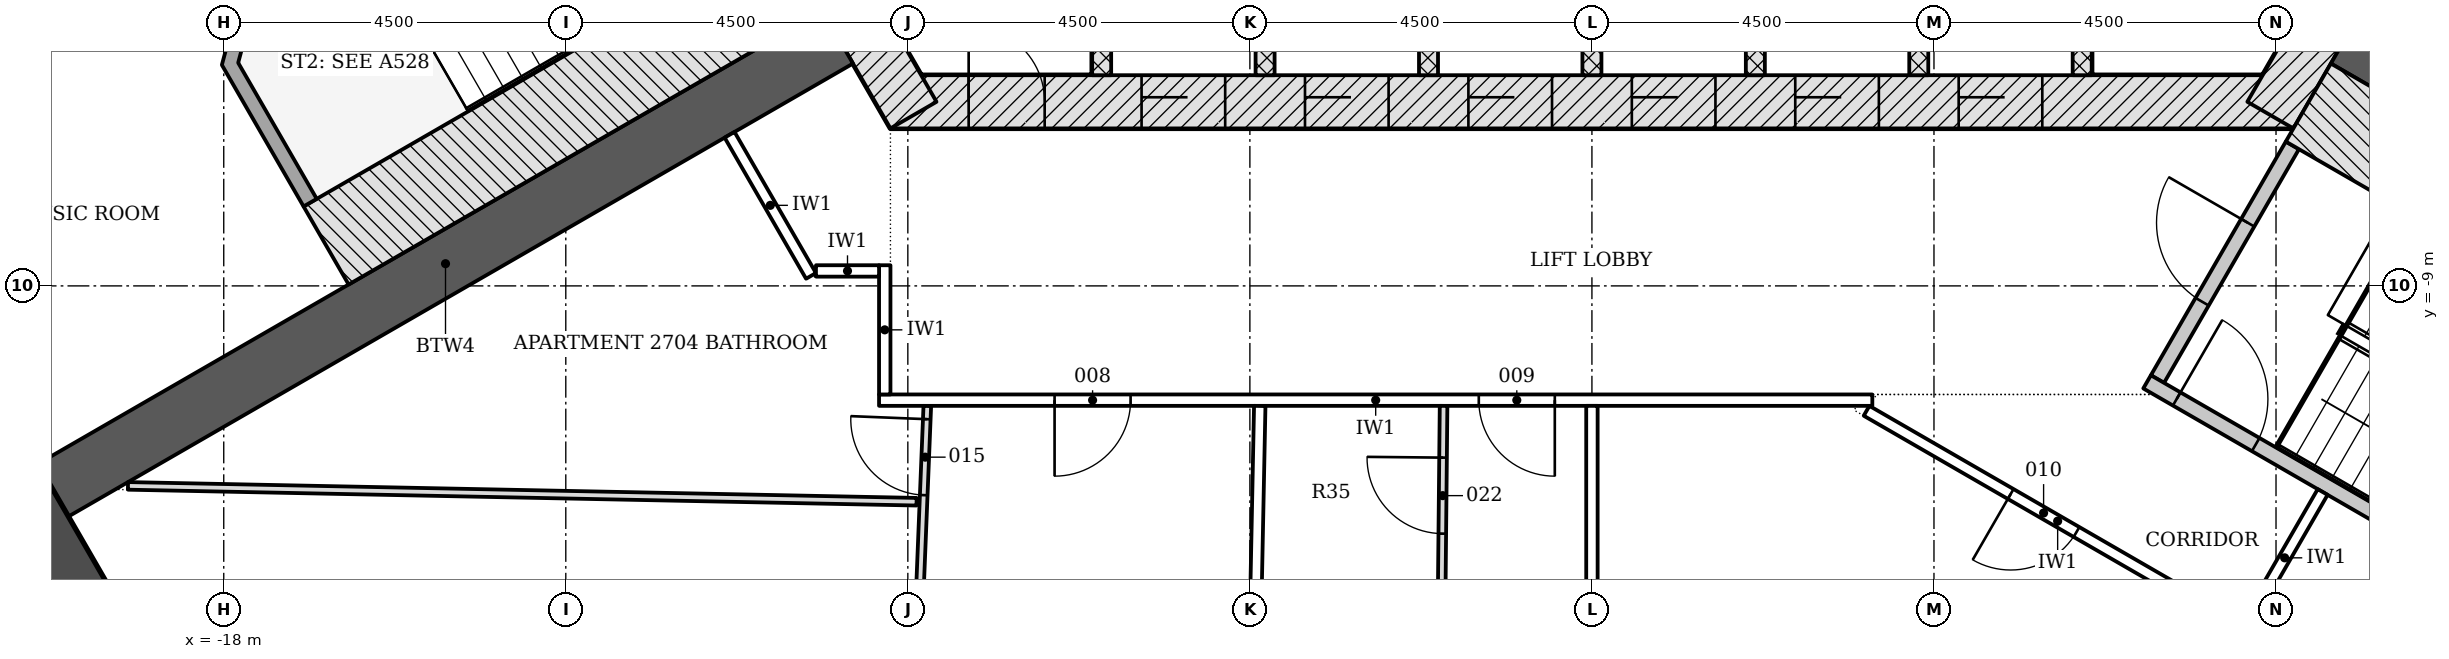
"""IFC4 building model, lengths in metres.
Left out: names, types, materials, properties, quantities, classifications, styles, units other than length and angle.
Written with IfcOpenShell. Run it as: python <this file> out.ifc"""

import sys

from ifc_helpers import new_model, si_unit, direction, frame, frame_2d, origin, origin_2d, place, context, subcontext, project, spatial, polyline, rectangle, outline, extrude, element, fill, save


model = new_model("IFC4")
c1 = context("Model", 3, precision=1e-05, world=origin(), true_north=direction((0.0, 1.0)))
c2 = subcontext(c1, "Body", "Model", "MODEL_VIEW")
j1 = project(units=[si_unit("LENGTHUNIT", "METRE"), si_unit("PLANEANGLEUNIT", "RADIAN")], contexts=[c1])
p1 = place(None, origin())
s1 = spatial("IfcSite", under=j1, at=p1, CompositionType="ELEMENT")
p2 = place(p1, origin())
s2 = spatial("IfcBuilding", under=s1, at=p2, CompositionType="ELEMENT")
p3 = place(p2, frame((0.0, 0.0, 105.9)))
s3 = spatial("IfcBuildingStorey", under=s2, at=p3, CompositionType="ELEMENT", Elevation=105.9)
p4 = place(p3, frame((-9.229, -6.578, -0.2), z_axis=(0.0, 0.0, 1.0), x_axis=(1.0, 0.0, 0.0)))
e1 = element("IfcWall", 1, at=p4, inside=s3, PredefinedType="SHEAR", context=c2, shape_type="SweptSolid", body=[
    extrude(rectangle(XDim=18.458, YDim=0.7, at=frame_2d((9.229, 0.0))), origin(), (0.0, 0.0, 1.0), 3.6),
])
p5 = place(p4, frame((3.304, 0.0, 0.2)))
e2 = element("IfcOpeningElement", 2, at=p5, cuts=e1, PredefinedType="OPENING", context=c2, shape_type="SweptSolid", body=[
    extrude(rectangle(XDim=1.1, YDim=2.1, at=frame_2d((0.55, 1.05))), frame((0.0, 0.36, 0.0), z_axis=(0.0, -1.0, 0.0), x_axis=(1.0, 0.0, 0.0)), (0.0, 0.0, 1.0), 0.72),
])
p6 = place(p4, frame((5.454, 0.0, 0.2)))
e3 = element("IfcOpeningElement", 3, at=p6, cuts=e1, PredefinedType="OPENING", context=c2, shape_type="SweptSolid", body=[
    extrude(rectangle(XDim=1.1, YDim=2.1, at=frame_2d((0.55, 1.05))), frame((0.0, 0.36, 0.0), z_axis=(0.0, -1.0, 0.0), x_axis=(1.0, 0.0, 0.0)), (0.0, 0.0, 1.0), 0.72),
])
p7 = place(p4, frame((7.604, 0.0, 0.2)))
e4 = element("IfcOpeningElement", 4, at=p7, cuts=e1, PredefinedType="OPENING", context=c2, shape_type="SweptSolid", body=[
    extrude(rectangle(XDim=1.1, YDim=2.1, at=frame_2d((0.55, 1.05))), frame((0.0, 0.36, 0.0), z_axis=(0.0, -1.0, 0.0), x_axis=(1.0, 0.0, 0.0)), (0.0, 0.0, 1.0), 0.72),
])
p8 = place(p4, frame((9.754, 0.0, 0.2)))
e5 = element("IfcOpeningElement", 5, at=p8, cuts=e1, PredefinedType="OPENING", context=c2, shape_type="SweptSolid", body=[
    extrude(rectangle(XDim=1.1, YDim=2.1, at=frame_2d((0.55, 1.05))), frame((0.0, 0.36, 0.0), z_axis=(0.0, -1.0, 0.0), x_axis=(1.0, 0.0, 0.0)), (0.0, 0.0, 1.0), 0.72),
])
p9 = place(p4, frame((11.904, 0.0, 0.2)))
e6 = element("IfcOpeningElement", 6, at=p9, cuts=e1, PredefinedType="OPENING", context=c2, shape_type="SweptSolid", body=[
    extrude(rectangle(XDim=1.1, YDim=2.1, at=frame_2d((0.55, 1.05))), frame((0.0, 0.36, 0.0), z_axis=(0.0, -1.0, 0.0), x_axis=(1.0, 0.0, 0.0)), (0.0, 0.0, 1.0), 0.72),
])
p10 = place(p4, frame((14.054, 0.0, 0.2)))
e7 = element("IfcOpeningElement", 7, at=p10, cuts=e1, PredefinedType="OPENING", context=c2, shape_type="SweptSolid", body=[
    extrude(rectangle(XDim=1.1, YDim=2.1, at=frame_2d((0.55, 1.05))), frame((0.0, 0.36, 0.0), z_axis=(0.0, -1.0, 0.0), x_axis=(1.0, 0.0, 0.0)), (0.0, 0.0, 1.0), 0.72),
])
p11 = place(p4, frame((1.029, 0.0, 0.2)))
e8 = element("IfcOpeningElement", 8, at=p11, cuts=e1, PredefinedType="OPENING", context=c2, shape_type="SweptSolid", body=[
    extrude(rectangle(XDim=1.0, YDim=2.1, at=frame_2d((0.5, 1.05))), frame((0.0, 0.36, 0.0), z_axis=(0.0, -1.0, 0.0), x_axis=(1.0, 0.0, 0.0)), (0.0, 0.0, 1.0), 0.72),
])
for number, where, z_axis, x_axis in (
    (9, (8.926, -6.753, -0.2), (0.0, 0.0, 1.0), (0.5, 0.866, 0.0)),
    (10, (-10.311, -4.353, -0.2), (0.0, 0.0, 1.0), (0.5, -0.866, 0.0)),
):
    element("IfcWall", number, at=place(p3, frame(where, z_axis=z_axis, x_axis=x_axis)), inside=s3, PredefinedType="SHEAR", context=c2, shape_type="SweptSolid", body=[
        extrude(rectangle(XDim=2.771, YDim=0.7, at=frame_2d((1.386, 0.0))), origin(), (0.0, 0.0, 1.0), 3.6),
    ])
for number, where, z_axis, x_axis in (
    (11, (-9.922, -5.728, -0.2), (0.0, 0.0, 1.0), (-0.866, -0.5, 0.0)),
    (12, (9.922, -5.728, -0.2), (0.0, 0.0, 1.0), (0.866, -0.5, 0.0)),
):
    element("IfcWall", number, at=place(p3, frame(where, z_axis=z_axis, x_axis=x_axis)), inside=s3, PredefinedType="SHEAR", context=c2, shape_type="SweptSolid", body=[
        extrude(rectangle(XDim=11.918, YDim=0.8, at=frame_2d((5.959, 0.0))), origin(), (0.0, 0.0, 1.0), 3.6),
    ])
p12 = place(p3, frame((-21.542, -12.438, -0.2), z_axis=(0.0, 0.0, 1.0), x_axis=(-0.866025403784, -0.5, 0.0)))
e13 = element("IfcColumn", 13, at=p12, inside=s3, PredefinedType="COLUMN", context=c2, shape_type="SweptSolid", body=[
    extrude(rectangle(XDim=3.0, YDim=3.0, at=origin_2d()), origin(), (0.0, 0.0, 1.0), 3.6),
])
p13 = place(p3, origin())
e14 = element("IfcWall", 14, at=p13, inside=s3, PredefinedType="NOTDEFINED", context=c2, shape_type="SweptSolid", body=[
    extrude(outline(polyline([(-23.152, -7.396), (-24.245, -9.732), (-24.631, -11.114), (-24.565, -12.547), (-24.054, -13.887), (-23.148, -15.0), (-21.94, -15.774), (-20.551, -16.13), (-17.981, -16.352), (-17.955, -16.053), (-20.5, -15.833), (-21.819, -15.495), (-22.946, -14.774), (-23.791, -13.735), (-24.267, -12.485), (-24.329, -11.148), (-23.962, -9.837), (-22.88, -7.523), (-23.152, -7.396)])), origin(), (0.0, 0.0, 1.0), 3.3),
])
for number, where, z_axis, x_axis in (
    (15, (-6.45, -6.228, -0.2), (0.0, 0.0, 1.0), (0.0, 1.0, 0.0)),
    (16, (-4.3, -6.228, -0.2), (0.0, 0.0, 1.0), (0.0, 1.0, 0.0)),
    (17, (-2.15, -6.228, -0.2), (0.0, 0.0, 1.0), (0.0, 1.0, 0.0)),
    (18, (0.0, -6.228, -0.2), (0.0, 0.0, 1.0), (0.0, 1.0, 0.0)),
    (19, (2.15, -6.228, -0.2), (0.0, 0.0, 1.0), (0.0, 1.0, 0.0)),
    (20, (4.3, -6.228, -0.2), (0.0, 0.0, 1.0), (0.0, 1.0, 0.0)),
    (21, (6.45, -6.228, -0.2), (0.0, 0.0, 1.0), (0.0, 1.0, 0.0)),
):
    element("IfcWall", number, at=place(p3, frame(where, z_axis=z_axis, x_axis=x_axis)), inside=s3, PredefinedType="PARTITIONING", context=c2, shape_type="SweptSolid", body=[
        extrude(rectangle(XDim=2.5, YDim=0.25, at=frame_2d((1.25, 0.0))), origin(), (0.0, 0.0, 1.0), 3.6),
    ])
p14 = place(p3, frame((-10.418, -4.868, -0.2), z_axis=(0.0, 0.0, 1.0), x_axis=(-0.866018442252, -0.500012057535, 0.0)))
e22 = element("IfcWall", 22, at=p14, inside=s3, PredefinedType="SHEAR", context=c2, shape_type="SweptSolid", body=[
    extrude(rectangle(XDim=7.2, YDim=1.186, at=frame_2d((3.6, 0.0))), origin(), (0.0, 0.0, 1.0), 3.6),
])
p15 = place(p3, frame((0.0, 0.0, -0.2)))
e23 = element("IfcWall", 23, at=p15, inside=s3, PredefinedType="SHEAR", context=c2, shape_type="SweptSolid", body=[
    extrude(outline(polyline([(-17.439, -3.907), (-18.025, -6.093), (-16.95, -7.955), (-16.777, -7.855), (-17.81, -6.065), (-17.267, -4.039), (-17.339, -4.081), (-17.339, -4.081), (-17.339, -4.081), (-17.339, -4.081), (-17.339, -4.081), (-17.339, -4.081), (-17.339, -4.081), (-17.339, -4.081), (-17.339, -4.081), (-17.339, -4.081), (-17.339, -4.081), (-17.339, -4.081), (-17.339, -4.081), (-17.339, -4.081), (-17.339, -4.081), (-17.339, -4.081), (-17.339, -4.081), (-17.439, -3.907)])), origin(), (0.0, 0.0, 1.0), 3.6),
])
p16 = place(p3, frame((7.44, -10.226, -0.2), z_axis=(0.0, 0.0, 1.0), x_axis=(0.500022077904, 0.866012656725, 0.0)))
e24 = element("IfcWall", 24, at=p16, inside=s3, PredefinedType="SHEAR", context=c2, shape_type="SweptSolid", body=[
    extrude(rectangle(XDim=3.55, YDim=0.2, at=frame_2d((1.775, 0.0))), origin(), (0.0, 0.0, 1.0), 3.6),
])
p17 = place(p16, frame((1.175, 0.0, 0.2)))
e25 = element("IfcOpeningElement", 25, at=p17, cuts=e24, PredefinedType="OPENING", context=c2, shape_type="SweptSolid", body=[
    extrude(rectangle(XDim=1.2, YDim=2.1, at=frame_2d((0.6, 1.05))), frame((0.0, 0.11, 0.0), z_axis=(0.0, -1.0, 0.0), x_axis=(1.0, 0.0, 0.0)), (0.0, 0.0, 1.0), 0.22),
])
p18 = place(p3, frame((7.304, -10.262, -0.2), z_axis=(0.0, 0.0, 1.0), x_axis=(0.866026594901, -0.49999793692, 0.0)))
e26 = element("IfcWall", 26, at=p18, inside=s3, PredefinedType="SHEAR", context=c2, shape_type="SweptSolid", body=[
    extrude(rectangle(XDim=5.6, YDim=0.2, at=frame_2d((2.8, 0.0))), origin(), (0.0, 0.0, 1.0), 3.6),
])
p19 = place(p18, frame((0.45, 0.0, 0.2)))
e27 = element("IfcOpeningElement", 27, at=p19, cuts=e26, PredefinedType="OPENING", context=c2, shape_type="SweptSolid", body=[
    extrude(rectangle(XDim=1.2, YDim=2.1, at=frame_2d((0.6, 1.05))), frame((0.0, 0.11, 0.0), z_axis=(0.0, -1.0, 0.0), x_axis=(1.0, 0.0, 0.0)), (0.0, 0.0, 1.0), 0.22),
])
p20 = place(p3, frame((9.425, -6.588, -0.2), z_axis=(0.0, 0.0, 1.0), x_axis=(0.866018442252, -0.500012057535, 0.0)))
e28 = element("IfcWall", 28, at=p20, inside=s3, PredefinedType="SHEAR", context=c2, shape_type="SweptSolid", body=[
    extrude(rectangle(XDim=7.2, YDim=1.186, at=frame_2d((3.6, 0.0))), origin(), (0.0, 0.0, 1.0), 3.6),
])
p21 = place(p3, frame((3.689, -10.503, 0.0), z_axis=(0.0, 0.0, 1.0), x_axis=(-1.0, 0.0, 0.0)))
e29 = element("IfcWall", 29, at=p21, inside=s3, PredefinedType="PARTITIONING", context=c2, shape_type="SweptSolid", body=[
    extrude(rectangle(XDim=13.068, YDim=0.15, at=frame_2d((6.534, 0.0))), origin(), (0.0, 0.0, 1.0), 2.847),
])
p22 = place(p21, frame((9.758, 0.0, 0.0)))
e30 = element("IfcOpeningElement", 30, at=p22, cuts=e29, PredefinedType="OPENING", context=c2, shape_type="SweptSolid", body=[
    extrude(rectangle(XDim=1.0, YDim=2.1, at=frame_2d((0.5, 1.05))), frame((0.0, 0.085, 0.0), z_axis=(0.0, -1.0, 0.0), x_axis=(1.0, 0.0, 0.0)), (0.0, 0.0, 1.0), 0.17),
])
p23 = place(p21, frame((4.177, 0.0, 0.0)))
e31 = element("IfcOpeningElement", 31, at=p23, cuts=e29, PredefinedType="OPENING", context=c2, shape_type="SweptSolid", body=[
    extrude(rectangle(XDim=1.0, YDim=2.1, at=frame_2d((0.5, 1.05))), frame((0.0, 0.085, 0.0), z_axis=(0.0, -1.0, 0.0), x_axis=(1.0, 0.0, 0.0)), (0.0, 0.0, 1.0), 0.17),
])
p24 = place(p3, frame((8.641, -13.546, 0.0), z_axis=(0.0, 0.0, 1.0), x_axis=(-0.866042728627, 0.499969991291, 0.0)))
e32 = element("IfcWall", 32, at=p24, inside=s3, PredefinedType="PARTITIONING", context=c2, shape_type="SweptSolid", body=[
    extrude(rectangle(XDim=5.805, YDim=0.15, at=frame_2d((2.903, 0.0))), origin(), (0.0, 0.0, 1.0), 2.847),
])
p25 = place(p24, frame((2.616, 0.0, 0.0)))
e33 = element("IfcOpeningElement", 33, at=p25, cuts=e32, PredefinedType="OPENING", context=c2, shape_type="SweptSolid", body=[
    extrude(rectangle(XDim=1.0, YDim=2.1, at=frame_2d((0.5, 1.05))), frame((0.0, 0.085, 0.0), z_axis=(0.0, -1.0, 0.0), x_axis=(1.0, 0.0, 0.0)), (0.0, 0.0, 1.0), 0.17),
])
p26 = place(p3, frame((8.614, -13.444, 0.0), z_axis=(0.0, 0.0, 1.0), x_axis=(0.499972520799, 0.866041268327, 0.0)))
e34 = element("IfcWall", 34, at=p26, inside=s3, PredefinedType="PARTITIONING", context=c2, shape_type="SweptSolid", body=[
    extrude(rectangle(XDim=2.0, YDim=0.15, at=frame_2d((1.0, 0.0))), origin(), (0.0, 0.0, 1.0), 2.923),
])
p27 = place(p3, frame((-11.345, -7.012, 0.0), z_axis=(0.0, 0.0, 1.0), x_axis=(0.499998569178, -0.866026229868, 0.0)))
e35 = element("IfcWall", 35, at=p27, inside=s3, PredefinedType="PARTITIONING", context=c2, shape_type="SweptSolid", body=[
    extrude(rectangle(XDim=2.143, YDim=0.15, at=frame_2d((1.072, 0.0))), origin(), (0.0, 0.0, 1.0), 3.4),
])
p28 = place(p3, frame((-9.304, -10.428, 0.0), z_axis=(0.0, 0.0, 1.0), x_axis=(0.0, 1.0, 0.0)))
e36 = element("IfcWall", 36, at=p28, inside=s3, PredefinedType="PARTITIONING", context=c2, shape_type="SweptSolid", body=[
    extrude(rectangle(XDim=1.7, YDim=0.15, at=frame_2d((0.85, 0.0))), origin(), (0.0, 0.0, 1.0), 3.4),
])
p29 = place(p3, frame((-10.209, -8.803, 0.0), z_axis=(0.0, 0.0, 1.0), x_axis=(1.0, 0.0, 0.0)))
e37 = element("IfcWall", 37, at=p29, inside=s3, PredefinedType="PARTITIONING", context=c2, shape_type="SweptSolid", body=[
    extrude(rectangle(XDim=0.83, YDim=0.15, at=frame_2d((0.415, 0.0))), origin(), (0.0, 0.0, 1.0), 3.4),
])
p30 = place(p3, frame((0.0, -16.274, 0.0), z_axis=(0.0, 0.0, 1.0), x_axis=(0.0, 1.0, 0.0)))
e38 = element("IfcWall", 38, at=p30, inside=s3, PredefinedType="PARTITIONING", context=c2, shape_type="SweptSolid", body=[
    extrude(rectangle(XDim=5.696, YDim=0.15, at=frame_2d((2.848, 0.0))), origin(), (0.0, 0.0, 1.0), 2.847),
])
p31 = place(p3, frame((-4.484, -16.229, 0.0), z_axis=(0.0, 0.0, 1.0), x_axis=(0.020089281754, 0.999798190016, 0.0)))
e39 = element("IfcWall", 39, at=p31, inside=s3, PredefinedType="PARTITIONING", context=c2, shape_type="SweptSolid", body=[
    extrude(rectangle(XDim=5.651, YDim=0.15, at=frame_2d((2.826, 0.0))), origin(), (0.0, 0.0, 1.0), 2.847),
])
p32 = place(p3, frame((-8.885, -11.839, 0.0), z_axis=(0.0, 0.0, 1.0), x_axis=(-0.999798608679, 0.020068434987, 0.0)))
e40 = element("IfcWall", 40, at=p32, inside=s3, PredefinedType="PARTITIONING", context=c2, shape_type="SweptSolid", body=[
    extrude(rectangle(XDim=10.377, YDim=0.1, at=frame_2d((5.188, 0.0))), origin(), (0.0, 0.0, 1.0), 2.847),
])
p33 = place(p3, frame((-8.966, -16.094, 0.0), z_axis=(0.0, 0.0, 1.0), x_axis=(0.040167671745, 0.999192953411, 0.0)))
e41 = element("IfcWall", 41, at=p33, inside=s3, PredefinedType="PARTITIONING", context=c2, shape_type="SweptSolid", body=[
    extrude(rectangle(XDim=5.519, YDim=0.1, at=frame_2d((2.759, 0.0))), origin(), (0.0, 0.0, 1.0), 2.847),
])
p34 = place(p33, frame((4.345, 0.0, 0.0)))
e42 = element("IfcOpeningElement", 42, at=p34, cuts=e41, PredefinedType="OPENING", context=c2, shape_type="SweptSolid", body=[
    extrude(rectangle(XDim=1.0, YDim=2.1, at=frame_2d((0.5, 1.05))), frame((0.0, 0.06, 0.0), z_axis=(0.0, -1.0, 0.0), x_axis=(1.0, 0.0, 0.0)), (0.0, 0.0, 1.0), 0.12),
])
p35 = place(p33, frame((1.634, 0.0, 0.0)))
e43 = element("IfcOpeningElement", 43, at=p35, cuts=e41, PredefinedType="OPENING", context=c2, shape_type="SweptSolid", body=[
    extrude(rectangle(XDim=1.0, YDim=2.1, at=frame_2d((0.5, 1.05))), frame((0.0, 0.06, 0.0), z_axis=(0.0, -1.0, 0.0), x_axis=(1.0, 0.0, 0.0)), (0.0, 0.0, 1.0), 0.12),
])
p36 = place(p3, frame((-1.976, -12.959, 0.0), z_axis=(0.0, 0.0, 1.0), x_axis=(0.009947205513, 0.999950525327, 0.0)))
e44 = element("IfcWall", 44, at=p36, inside=s3, PredefinedType="PARTITIONING", context=c2, shape_type="SweptSolid", body=[
    extrude(rectangle(XDim=2.381, YDim=0.1, at=frame_2d((1.19, 0.0))), origin(), (0.0, 0.0, 1.0), 3.4),
])
p37 = place(p36, frame((0.7, 0.0, 0.0)))
e45 = element("IfcOpeningElement", 45, at=p37, cuts=e44, PredefinedType="OPENING", context=c2, shape_type="SweptSolid", body=[
    extrude(rectangle(XDim=1.0, YDim=2.1, at=frame_2d((0.5, 1.05))), frame((0.0, 0.06, 0.0), z_axis=(0.0, -1.0, 0.0), x_axis=(1.0, 0.0, 0.0)), (0.0, 0.0, 1.0), 0.12),
])
p38 = place(p5, origin())
e46 = element("IfcDoor", 46, at=p38, inside=s3, OperationType="DOUBLE_DOOR_SLIDING", PredefinedType="DOOR", context=c2, shape_type="SweptSolid", body=[
    extrude(rectangle(XDim=1.1, YDim=2.1, at=frame_2d((0.55, 1.05))), frame((0.0, 0.025, 0.0), z_axis=(0.0, -1.0, 0.0), x_axis=(1.0, 0.0, 0.0)), (0.0, 0.0, 1.0), 0.05),
])
fill(e2, e46)
p39 = place(p6, origin())
e47 = element("IfcDoor", 47, at=p39, inside=s3, OperationType="DOUBLE_DOOR_SLIDING", PredefinedType="DOOR", context=c2, shape_type="SweptSolid", body=[
    extrude(rectangle(XDim=1.1, YDim=2.1, at=frame_2d((0.55, 1.05))), frame((0.0, 0.025, 0.0), z_axis=(0.0, -1.0, 0.0), x_axis=(1.0, 0.0, 0.0)), (0.0, 0.0, 1.0), 0.05),
])
fill(e3, e47)
p40 = place(p7, origin())
e48 = element("IfcDoor", 48, at=p40, inside=s3, OperationType="DOUBLE_DOOR_SLIDING", PredefinedType="DOOR", context=c2, shape_type="SweptSolid", body=[
    extrude(rectangle(XDim=1.1, YDim=2.1, at=frame_2d((0.55, 1.05))), frame((0.0, 0.025, 0.0), z_axis=(0.0, -1.0, 0.0), x_axis=(1.0, 0.0, 0.0)), (0.0, 0.0, 1.0), 0.05),
])
fill(e4, e48)
p41 = place(p8, origin())
e49 = element("IfcDoor", 49, at=p41, inside=s3, OperationType="DOUBLE_DOOR_SLIDING", PredefinedType="DOOR", context=c2, shape_type="SweptSolid", body=[
    extrude(rectangle(XDim=1.1, YDim=2.1, at=frame_2d((0.55, 1.05))), frame((0.0, 0.025, 0.0), z_axis=(0.0, -1.0, 0.0), x_axis=(1.0, 0.0, 0.0)), (0.0, 0.0, 1.0), 0.05),
])
fill(e5, e49)
p42 = place(p9, origin())
e50 = element("IfcDoor", 50, at=p42, inside=s3, OperationType="DOUBLE_DOOR_SLIDING", PredefinedType="DOOR", context=c2, shape_type="SweptSolid", body=[
    extrude(rectangle(XDim=1.1, YDim=2.1, at=frame_2d((0.55, 1.05))), frame((0.0, 0.025, 0.0), z_axis=(0.0, -1.0, 0.0), x_axis=(1.0, 0.0, 0.0)), (0.0, 0.0, 1.0), 0.05),
])
fill(e6, e50)
p43 = place(p10, origin())
e51 = element("IfcDoor", 51, at=p43, inside=s3, OperationType="DOUBLE_DOOR_SLIDING", PredefinedType="DOOR", context=c2, shape_type="SweptSolid", body=[
    extrude(rectangle(XDim=1.1, YDim=2.1, at=frame_2d((0.55, 1.05))), frame((0.0, 0.025, 0.0), z_axis=(0.0, -1.0, 0.0), x_axis=(1.0, 0.0, 0.0)), (0.0, 0.0, 1.0), 0.05),
])
fill(e7, e51)
p44 = place(p11, origin())
e52 = element("IfcDoor", 52, at=p44, inside=s3, OperationType="SINGLE_SWING_LEFT", PredefinedType="DOOR", context=c2, shape_type="SweptSolid", body=[
    extrude(rectangle(XDim=1.0, YDim=2.1, at=frame_2d((0.5, 1.05))), frame((0.0, 0.075, 0.0), z_axis=(0.0, -1.0, 0.0), x_axis=(1.0, 0.0, 0.0)), (0.0, 0.0, 1.0), 0.15),
])
fill(e8, e52)
p45 = place(p17, origin())
e53 = element("IfcDoor", 53, at=p45, inside=s3, OperationType="SINGLE_SWING_RIGHT", PredefinedType="DOOR", context=c2, shape_type="SweptSolid", body=[
    extrude(rectangle(XDim=1.2, YDim=2.1, at=frame_2d((0.6, 1.05))), frame((0.0, 0.025, 0.0), z_axis=(0.0, -1.0, 0.0), x_axis=(1.0, 0.0, 0.0)), (0.0, 0.0, 1.0), 0.05),
])
fill(e25, e53)
p46 = place(p19, origin())
e54 = element("IfcDoor", 54, at=p46, inside=s3, OperationType="SINGLE_SWING_LEFT", PredefinedType="DOOR", context=c2, shape_type="SweptSolid", body=[
    extrude(rectangle(XDim=1.2, YDim=2.1, at=frame_2d((0.6, 1.05))), frame((0.0, 0.025, 0.0), z_axis=(0.0, -1.0, 0.0), x_axis=(1.0, 0.0, 0.0)), (0.0, 0.0, 1.0), 0.05),
])
fill(e27, e54)
p47 = place(p22, origin())
e55 = element("IfcDoor", 55, at=p47, inside=s3, OperationType="SINGLE_SWING_RIGHT", PredefinedType="DOOR", context=c2, shape_type="SweptSolid", body=[
    extrude(rectangle(XDim=1.0, YDim=2.1, at=frame_2d((0.5, 1.05))), frame((0.0, 0.025, 0.0), z_axis=(0.0, -1.0, 0.0), x_axis=(1.0, 0.0, 0.0)), (0.0, 0.0, 1.0), 0.05),
])
fill(e30, e55)
p48 = place(p23, origin())
e56 = element("IfcDoor", 56, at=p48, inside=s3, OperationType="SINGLE_SWING_LEFT", PredefinedType="DOOR", context=c2, shape_type="SweptSolid", body=[
    extrude(rectangle(XDim=1.0, YDim=2.1, at=frame_2d((0.5, 1.05))), frame((0.0, 0.025, 0.0), z_axis=(0.0, -1.0, 0.0), x_axis=(1.0, 0.0, 0.0)), (0.0, 0.0, 1.0), 0.05),
])
fill(e31, e56)
p49 = place(p25, origin())
e57 = element("IfcDoor", 57, at=p49, inside=s3, OperationType="SINGLE_SWING_RIGHT", PredefinedType="DOOR", context=c2, shape_type="SweptSolid", body=[
    extrude(rectangle(XDim=1.0, YDim=2.1, at=frame_2d((0.5, 1.05))), frame((0.0, 0.025, 0.0), z_axis=(0.0, -1.0, 0.0), x_axis=(1.0, 0.0, 0.0)), (0.0, 0.0, 1.0), 0.05),
])
fill(e33, e57)
p50 = place(p34, origin())
e58 = element("IfcDoor", 58, at=p50, inside=s3, OperationType="SINGLE_SWING_RIGHT", PredefinedType="DOOR", context=c2, shape_type="SweptSolid", body=[
    extrude(rectangle(XDim=1.0, YDim=2.1, at=frame_2d((0.5, 1.05))), frame((0.0, 0.025, 0.0), z_axis=(0.0, -1.0, 0.0), x_axis=(1.0, 0.0, 0.0)), (0.0, 0.0, 1.0), 0.05),
])
fill(e42, e58)
p51 = place(p37, origin())
e59 = element("IfcDoor", 59, at=p51, inside=s3, OperationType="SINGLE_SWING_RIGHT", PredefinedType="DOOR", context=c2, shape_type="SweptSolid", body=[
    extrude(rectangle(XDim=1.0, YDim=2.1, at=frame_2d((0.5, 1.05))), frame((0.0, 0.025, 0.0), z_axis=(0.0, -1.0, 0.0), x_axis=(1.0, 0.0, 0.0)), (0.0, 0.0, 1.0), 0.05),
])
fill(e45, e59)
save(model, sys.argv[1])
